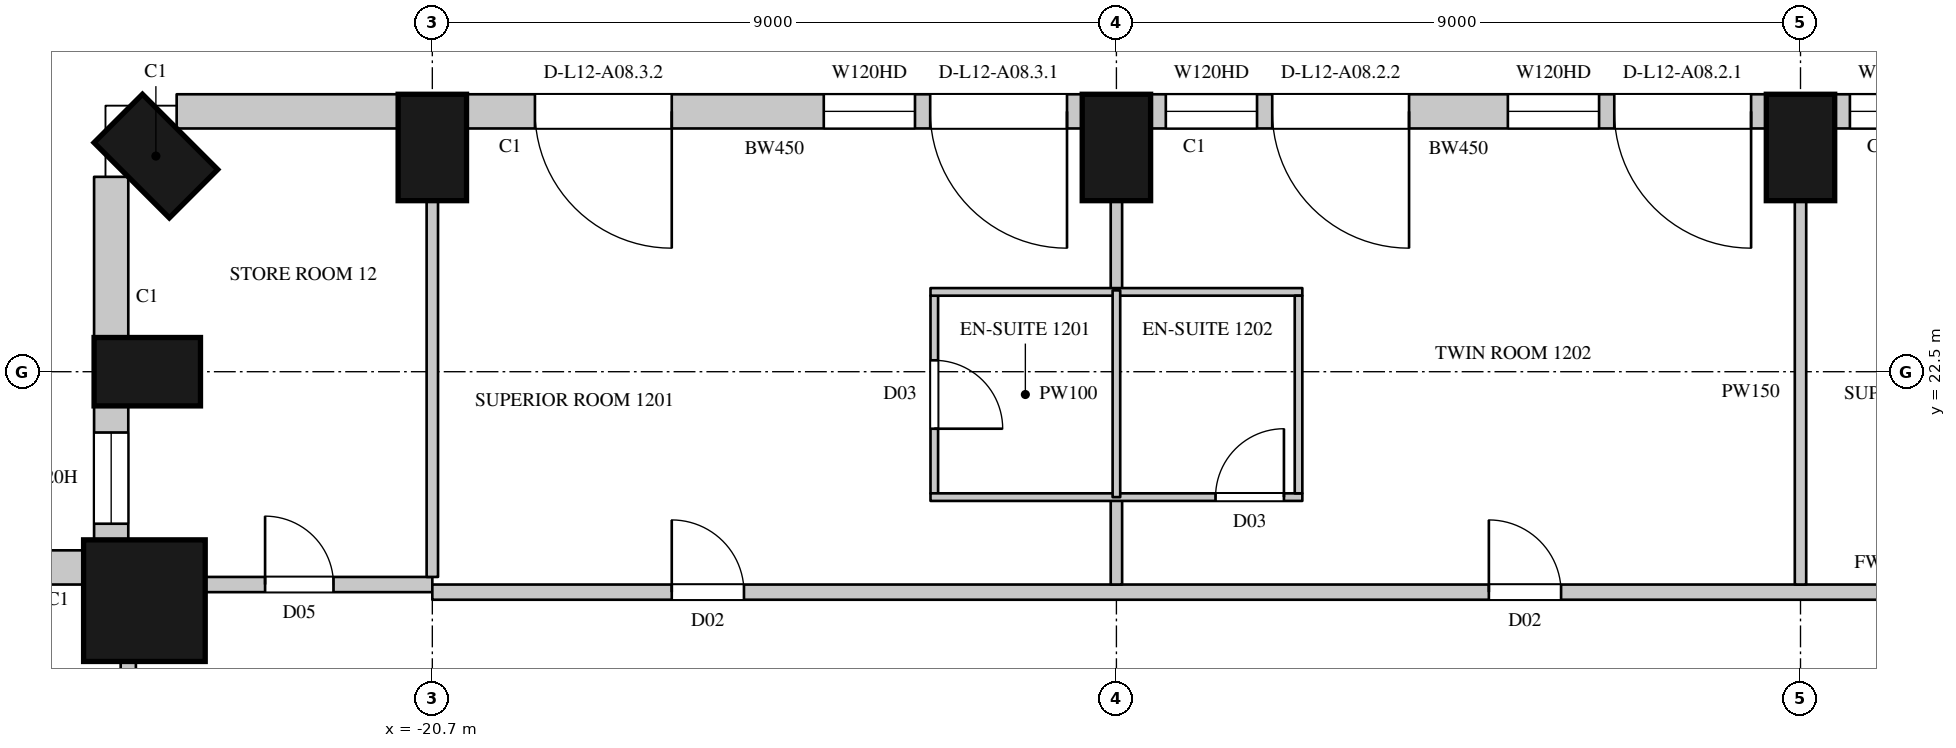
"""IFC4 building model, lengths in metres.
Left out: names, types, materials, properties, quantities, classifications, styles, units other than length and angle.
Written with IfcOpenShell. Run it as: python <this file> out.ifc"""

import sys

from ifc_helpers import new_model, si_unit, direction, frame, frame_2d, origin, origin_2d, place, context, subcontext, project, spatial, rectangle, circle, extrude, element, fill, save


model = new_model("IFC4")
c1 = context("Model", 3, precision=1e-05, world=origin(), true_north=direction((0.0, 1.0)))
c2 = subcontext(c1, "Body", "Model", "MODEL_VIEW")
j1 = project(units=[si_unit("LENGTHUNIT", "METRE"), si_unit("PLANEANGLEUNIT", "RADIAN")], contexts=[c1])
p1 = place(None, origin())
s1 = spatial("IfcSite", under=j1, at=p1, CompositionType="ELEMENT")
p2 = place(p1, origin())
s2 = spatial("IfcBuilding", under=s1, at=p2, CompositionType="ELEMENT")
p3 = place(p2, frame((0.0, 0.0, 73.5)))
s3 = spatial("IfcBuildingStorey", under=s2, at=p3, CompositionType="ELEMENT", Elevation=73.5)
for number, where, z_axis, x_axis in (
    (1, (-2.7, 25.45, 0.0), (0.0, 0.0, 1.0), (-1.0, 0.0, 0.0)),
    (2, (-11.7, 25.45, 0.0), (0.0, 0.0, 1.0), (-1.0, 0.0, 0.0)),
    (3, (-20.7, 25.45, 0.0), (0.0, 0.0, 1.0), (-1.0, 0.0, 0.0)),
    (4, (-24.337, 25.337, 0.0), (0.0, 0.0, 1.0), (-0.707, -0.707, 0.0)),
    (5, (-24.45, 22.5, 0.0), (0.0, 0.0, 1.0), (0.0, -1.0, 0.0)),
):
    element("IfcColumn", number, at=place(p3, frame(where, z_axis=z_axis, x_axis=x_axis)), inside=s3, PredefinedType="COLUMN", context=c2, shape_type="SweptSolid", body=[
        extrude(rectangle(XDim=0.9, YDim=1.4, at=origin_2d()), origin(), (0.0, 0.0, 1.0), 3.6),
    ])
p4 = place(p3, frame((-24.488, 19.488, 0.0), z_axis=(0.0, 0.0, 1.0), x_axis=(1.0, 0.0, 0.0)))
e6 = element("IfcColumn", 6, at=p4, inside=s3, PredefinedType="COLUMN", context=c2, shape_type="SweptSolid", body=[
    extrude(circle(Radius=0.8, at=origin_2d()), origin(), (0.0, 0.0, 1.0), 3.6),
])
p5 = place(p3, frame((5.85, 25.925, 0.0), z_axis=(0.0, 0.0, 1.0), x_axis=(-1.0, 0.0, 0.0)))
e7 = element("IfcWall", 7, at=p5, inside=s3, PredefinedType="SOLIDWALL", context=c2, shape_type="SweptSolid", body=[
    extrude(rectangle(XDim=8.1, YDim=0.45, at=frame_2d((4.05, 0.0))), origin(), (0.0, 0.0, 1.0), 3.3),
])
p6 = place(p5, frame((0.2, 0.0, 0.0)))
e8 = element("IfcOpeningElement", 8, at=p6, cuts=e7, PredefinedType="OPENING", context=c2, shape_type="SweptSolid", body=[
    extrude(rectangle(XDim=1.8, YDim=2.4, at=frame_2d((0.9, 1.2))), frame((0.0, 0.235, 0.0), z_axis=(0.0, -1.0, 0.0), x_axis=(1.0, 0.0, 0.0)), (0.0, 0.0, 1.0), 0.47),
])
p7 = place(p5, frame((2.2, 0.0, 1.05)))
e9 = element("IfcOpeningElement", 9, at=p7, cuts=e7, PredefinedType="OPENING", context=c2, shape_type="SweptSolid", body=[
    extrude(rectangle(XDim=1.2, YDim=2.0, at=frame_2d((0.6, 1.0))), frame((0.0, 0.235, 0.0), z_axis=(0.0, -1.0, 0.0), x_axis=(1.0, 0.0, 0.0)), (0.0, 0.0, 1.0), 0.47),
])
p8 = place(p5, frame((4.7, 0.0, 0.0)))
e10 = element("IfcOpeningElement", 10, at=p8, cuts=e7, PredefinedType="OPENING", context=c2, shape_type="SweptSolid", body=[
    extrude(rectangle(XDim=1.8, YDim=2.4, at=frame_2d((0.9, 1.2))), frame((0.0, 0.235, 0.0), z_axis=(0.0, -1.0, 0.0), x_axis=(1.0, 0.0, 0.0)), (0.0, 0.0, 1.0), 0.47),
])
p9 = place(p5, frame((6.7, 0.0, 1.05)))
e11 = element("IfcOpeningElement", 11, at=p9, cuts=e7, PredefinedType="OPENING", context=c2, shape_type="SweptSolid", body=[
    extrude(rectangle(XDim=1.2, YDim=2.0, at=frame_2d((0.6, 1.0))), frame((0.0, 0.235, 0.0), z_axis=(0.0, -1.0, 0.0), x_axis=(1.0, 0.0, 0.0)), (0.0, 0.0, 1.0), 0.47),
])
p10 = place(p3, frame((-3.15, 25.925, 0.0), z_axis=(0.0, 0.0, 1.0), x_axis=(-1.0, 0.0, 0.0)))
e12 = element("IfcWall", 12, at=p10, inside=s3, PredefinedType="SOLIDWALL", context=c2, shape_type="SweptSolid", body=[
    extrude(rectangle(XDim=8.1, YDim=0.45, at=frame_2d((4.05, 0.0))), origin(), (0.0, 0.0, 1.0), 3.3),
])
p11 = place(p10, frame((0.2, 0.0, 0.0)))
e13 = element("IfcOpeningElement", 13, at=p11, cuts=e12, PredefinedType="OPENING", context=c2, shape_type="SweptSolid", body=[
    extrude(rectangle(XDim=1.8, YDim=2.4, at=frame_2d((0.9, 1.2))), frame((0.0, 0.235, 0.0), z_axis=(0.0, -1.0, 0.0), x_axis=(1.0, 0.0, 0.0)), (0.0, 0.0, 1.0), 0.47),
])
p12 = place(p10, frame((2.2, 0.0, 1.05)))
e14 = element("IfcOpeningElement", 14, at=p12, cuts=e12, PredefinedType="OPENING", context=c2, shape_type="SweptSolid", body=[
    extrude(rectangle(XDim=1.2, YDim=2.0, at=frame_2d((0.6, 1.0))), frame((0.0, 0.235, 0.0), z_axis=(0.0, -1.0, 0.0), x_axis=(1.0, 0.0, 0.0)), (0.0, 0.0, 1.0), 0.47),
])
p13 = place(p10, frame((4.7, 0.0, 0.0)))
e15 = element("IfcOpeningElement", 15, at=p13, cuts=e12, PredefinedType="OPENING", context=c2, shape_type="SweptSolid", body=[
    extrude(rectangle(XDim=1.8, YDim=2.4, at=frame_2d((0.9, 1.2))), frame((0.0, 0.235, 0.0), z_axis=(0.0, -1.0, 0.0), x_axis=(1.0, 0.0, 0.0)), (0.0, 0.0, 1.0), 0.47),
])
p14 = place(p10, frame((6.7, 0.0, 1.05)))
e16 = element("IfcOpeningElement", 16, at=p14, cuts=e12, PredefinedType="OPENING", context=c2, shape_type="SweptSolid", body=[
    extrude(rectangle(XDim=1.2, YDim=2.0, at=frame_2d((0.6, 1.0))), frame((0.0, 0.235, 0.0), z_axis=(0.0, -1.0, 0.0), x_axis=(1.0, 0.0, 0.0)), (0.0, 0.0, 1.0), 0.47),
])
p15 = place(p3, frame((-12.15, 25.925, 0.0), z_axis=(0.0, 0.0, 1.0), x_axis=(-1.0, 0.0, 0.0)))
e17 = element("IfcWall", 17, at=p15, inside=s3, PredefinedType="SOLIDWALL", context=c2, shape_type="SweptSolid", body=[
    extrude(rectangle(XDim=8.1, YDim=0.45, at=frame_2d((4.05, 0.0))), origin(), (0.0, 0.0, 1.0), 3.3),
])
p16 = place(p15, frame((0.2, 0.0, 0.0)))
e18 = element("IfcOpeningElement", 18, at=p16, cuts=e17, PredefinedType="OPENING", context=c2, shape_type="SweptSolid", body=[
    extrude(rectangle(XDim=1.8, YDim=2.4, at=frame_2d((0.9, 1.2))), frame((0.0, 0.235, 0.0), z_axis=(0.0, -1.0, 0.0), x_axis=(1.0, 0.0, 0.0)), (0.0, 0.0, 1.0), 0.47),
])
p17 = place(p15, frame((2.2, 0.0, 1.05)))
e19 = element("IfcOpeningElement", 19, at=p17, cuts=e17, PredefinedType="OPENING", context=c2, shape_type="SweptSolid", body=[
    extrude(rectangle(XDim=1.2, YDim=2.0, at=frame_2d((0.6, 1.0))), frame((0.0, 0.235, 0.0), z_axis=(0.0, -1.0, 0.0), x_axis=(1.0, 0.0, 0.0)), (0.0, 0.0, 1.0), 0.47),
])
p18 = place(p15, frame((5.4, 0.0, 0.0)))
e20 = element("IfcOpeningElement", 20, at=p18, cuts=e17, PredefinedType="OPENING", context=c2, shape_type="SweptSolid", body=[
    extrude(rectangle(XDim=1.8, YDim=2.4, at=frame_2d((0.9, 1.2))), frame((0.0, 0.235, 0.0), z_axis=(0.0, -1.0, 0.0), x_axis=(1.0, 0.0, 0.0)), (0.0, 0.0, 1.0), 0.47),
])
p19 = place(p3, frame((-21.15, 25.925, 0.0), z_axis=(0.0, 0.0, 1.0), x_axis=(-1.0, 0.0, 0.0)))
e21 = element("IfcWall", 21, at=p19, inside=s3, PredefinedType="SOLIDWALL", context=c2, shape_type="SweptSolid", body=[
    extrude(rectangle(XDim=2.914, YDim=0.45, at=frame_2d((1.457, 0.0))), origin(), (0.0, 0.0, 1.0), 3.3),
])
p20 = place(p3, frame((-24.925, 25.064, 0.0), z_axis=(0.0, 0.0, 1.0), x_axis=(0.0, -1.0, 0.0)))
e22 = element("IfcWall", 22, at=p20, inside=s3, PredefinedType="SOLIDWALL", context=c2, shape_type="SweptSolid", body=[
    extrude(rectangle(XDim=2.114, YDim=0.45, at=frame_2d((1.057, 0.0))), origin(), (0.0, 0.0, 1.0), 3.3),
])
p21 = place(p3, frame((-24.925, 22.05, 0.0), z_axis=(0.0, 0.0, 1.0), x_axis=(0.0, -1.0, 0.0)))
e23 = element("IfcWall", 23, at=p21, inside=s3, PredefinedType="SOLIDWALL", context=c2, shape_type="SweptSolid", body=[
    extrude(rectangle(XDim=1.792, YDim=0.45, at=frame_2d((0.896, 0.0))), origin(), (0.0, 0.0, 1.0), 3.3),
])
p22 = place(p21, frame((0.35, 0.0, 1.05)))
e24 = element("IfcOpeningElement", 24, at=p22, cuts=e23, PredefinedType="OPENING", context=c2, shape_type="SweptSolid", body=[
    extrude(rectangle(XDim=1.2, YDim=2.0, at=frame_2d((0.6, 1.0))), frame((0.0, 0.235, 0.0), z_axis=(0.0, -1.0, 0.0), x_axis=(1.0, 0.0, 0.0)), (0.0, 0.0, 1.0), 0.47),
])
p23 = place(p3, frame((-25.259, 19.925, 0.0), z_axis=(0.0, 0.0, 1.0), x_axis=(-1.0, 0.0, 0.0)))
e25 = element("IfcWall", 25, at=p23, inside=s3, PredefinedType="SOLIDWALL", context=c2, shape_type="SweptSolid", body=[
    extrude(rectangle(XDim=3.805, YDim=0.45, at=frame_2d((1.903, 0.0))), origin(), (0.0, 0.0, 1.0), 3.3),
])
p24 = place(p23, frame((0.592, 0.0, 1.05)))
e26 = element("IfcOpeningElement", 26, at=p24, cuts=e25, PredefinedType="OPENING", context=c2, shape_type="SweptSolid", body=[
    extrude(rectangle(XDim=2.7, YDim=2.0, at=frame_2d((1.35, 1.0))), frame((0.0, 0.235, 0.0), z_axis=(0.0, -1.0, 0.0), x_axis=(1.0, 0.0, 0.0)), (0.0, 0.0, 1.0), 0.47),
])
p25 = place(p3, frame((-24.7, 16.03, 0.0), z_axis=(0.0, 0.0, 1.0), x_axis=(0.0, 1.0, 0.0)))
e27 = element("IfcWall", 27, at=p25, inside=s3, PredefinedType="PARTITIONING", context=c2, shape_type="SweptSolid", body=[
    extrude(rectangle(XDim=2.67, YDim=0.2, at=frame_2d((1.335, 0.0))), origin(), (0.0, 0.0, 1.0), 3.3),
])
p26 = place(p25, frame((0.45, 0.0, 0.0)))
e28 = element("IfcOpeningElement", 28, at=p26, cuts=e27, PredefinedType="OPENING", context=c2, shape_type="SweptSolid", body=[
    extrude(rectangle(XDim=1.6, YDim=2.4, at=frame_2d((0.8, 1.2))), frame((0.0, 0.11, 0.0), z_axis=(0.0, -1.0, 0.0), x_axis=(1.0, 0.0, 0.0)), (0.0, 0.0, 1.0), 0.22),
])
p27 = place(p3, frame((-23.7, 19.7, 0.0), z_axis=(0.0, 0.0, 1.0), x_axis=(1.0, 0.0, 0.0)))
e29 = element("IfcWall", 29, at=p27, inside=s3, PredefinedType="PARTITIONING", context=c2, shape_type="SweptSolid", body=[
    extrude(rectangle(XDim=3.0, YDim=0.2, at=frame_2d((1.5, 0.0))), origin(), (0.0, 0.0, 1.0), 3.3),
])
p28 = place(p27, frame((0.8, 0.0, 0.0)))
e30 = element("IfcOpeningElement", 30, at=p28, cuts=e29, PredefinedType="OPENING", context=c2, shape_type="SweptSolid", body=[
    extrude(rectangle(XDim=0.9, YDim=2.2, at=frame_2d((0.45, 1.1))), frame((0.0, 0.11, 0.0), z_axis=(0.0, -1.0, 0.0), x_axis=(1.0, 0.0, 0.0)), (0.0, 0.0, 1.0), 0.22),
])
p29 = place(p3, frame((-20.7, 19.6, 0.0), z_axis=(0.0, 0.0, 1.0), x_axis=(1.0, 0.0, 0.0)))
e31 = element("IfcWall", 31, at=p29, inside=s3, PredefinedType="PARTITIONING", context=c2, shape_type="SweptSolid", body=[
    extrude(rectangle(XDim=38.184, YDim=0.2, at=frame_2d((19.092, 0.0))), origin(), (0.0, 0.0, 1.0), 3.3),
])
p30 = place(p29, frame((3.15, 0.0, 0.0)))
e32 = element("IfcOpeningElement", 32, at=p30, cuts=e31, PredefinedType="OPENING", context=c2, shape_type="SweptSolid", body=[
    extrude(rectangle(XDim=0.95, YDim=2.2, at=frame_2d((0.475, 1.1))), frame((0.0, 0.11, 0.0), z_axis=(0.0, -1.0, 0.0), x_axis=(1.0, 0.0, 0.0)), (0.0, 0.0, 1.0), 0.22),
])
p31 = place(p29, frame((13.9, 0.0, 0.0)))
e33 = element("IfcOpeningElement", 33, at=p31, cuts=e31, PredefinedType="OPENING", context=c2, shape_type="SweptSolid", body=[
    extrude(rectangle(XDim=0.95, YDim=2.2, at=frame_2d((0.475, 1.1))), frame((0.0, 0.11, 0.0), z_axis=(0.0, -1.0, 0.0), x_axis=(1.0, 0.0, 0.0)), (0.0, 0.0, 1.0), 0.22),
])
p32 = place(p29, frame((21.15, 0.0, 0.0)))
e34 = element("IfcOpeningElement", 34, at=p32, cuts=e31, PredefinedType="OPENING", context=c2, shape_type="SweptSolid", body=[
    extrude(rectangle(XDim=0.95, YDim=2.2, at=frame_2d((0.475, 1.1))), frame((0.0, 0.11, 0.0), z_axis=(0.0, -1.0, 0.0), x_axis=(1.0, 0.0, 0.0)), (0.0, 0.0, 1.0), 0.22),
])
p33 = place(p29, frame((31.9, 0.0, 0.0)))
e35 = element("IfcOpeningElement", 35, at=p33, cuts=e31, PredefinedType="OPENING", context=c2, shape_type="SweptSolid", body=[
    extrude(rectangle(XDim=0.95, YDim=2.2, at=frame_2d((0.475, 1.1))), frame((0.0, 0.11, 0.0), z_axis=(0.0, -1.0, 0.0), x_axis=(1.0, 0.0, 0.0)), (0.0, 0.0, 1.0), 0.22),
])
p34 = place(p29, frame((36.85, 0.0, 0.0)))
e36 = element("IfcOpeningElement", 36, at=p34, cuts=e31, PredefinedType="OPENING", context=c2, shape_type="SweptSolid", body=[
    extrude(rectangle(XDim=0.95, YDim=2.2, at=frame_2d((0.475, 1.1))), frame((0.0, 0.11, 0.0), z_axis=(0.0, -1.0, 0.0), x_axis=(1.0, 0.0, 0.0)), (0.0, 0.0, 1.0), 0.22),
])
p35 = place(p3, frame((-20.7, 19.8, 0.0), z_axis=(0.0, 0.0, 1.0), x_axis=(0.0, 1.0, 0.0)))
e37 = element("IfcWall", 37, at=p35, inside=s3, PredefinedType="PARTITIONING", context=c2, shape_type="SweptSolid", body=[
    extrude(rectangle(XDim=4.95, YDim=0.15, at=frame_2d((2.475, 0.0))), origin(), (0.0, 0.0, 1.0), 2.75),
])
p36 = place(p3, frame((-11.7, 19.7, 0.0), z_axis=(0.0, 0.0, 1.0), x_axis=(0.0, 1.0, 0.0)))
e38 = element("IfcWall", 38, at=p36, inside=s3, PredefinedType="PARTITIONING", context=c2, shape_type="SweptSolid", body=[
    extrude(rectangle(XDim=1.15, YDim=0.15, at=frame_2d((0.575, 0.0))), origin(), (0.0, 0.0, 1.0), 2.75),
])
p37 = place(p3, frame((-11.7, 23.57, 0.0), z_axis=(0.0, 0.0, 1.0), x_axis=(0.0, 1.0, 0.0)))
e39 = element("IfcWall", 39, at=p37, inside=s3, PredefinedType="PARTITIONING", context=c2, shape_type="SweptSolid", body=[
    extrude(rectangle(XDim=1.18, YDim=0.15, at=frame_2d((0.59, 0.0))), origin(), (0.0, 0.0, 1.0), 2.75),
])
p38 = place(p3, frame((-2.7, 19.7, 0.0), z_axis=(0.0, 0.0, 1.0), x_axis=(0.0, 1.0, 0.0)))
e40 = element("IfcWall", 40, at=p38, inside=s3, PredefinedType="PARTITIONING", context=c2, shape_type="SweptSolid", body=[
    extrude(rectangle(XDim=5.05, YDim=0.15, at=frame_2d((2.525, 0.0))), origin(), (0.0, 0.0, 1.0), 2.75),
])
p39 = place(p3, frame((-14.096, 20.9, 0.0), z_axis=(0.0, 0.0, 1.0), x_axis=(0.0, 1.0, 0.0)))
e41 = element("IfcWall", 41, at=p39, inside=s3, PredefinedType="PARTITIONING", context=c2, shape_type="SweptSolid", body=[
    extrude(rectangle(XDim=2.6, YDim=0.1, at=frame_2d((1.3, 0.0))), origin(), (0.0, 0.0, 1.0), 3.3),
])
p40 = place(p39, frame((0.85, 0.0, 0.0)))
e42 = element("IfcOpeningElement", 42, at=p40, cuts=e41, PredefinedType="OPENING", context=c2, shape_type="SweptSolid", body=[
    extrude(rectangle(XDim=0.9, YDim=2.2, at=frame_2d((0.45, 1.1))), frame((0.0, 0.06, 0.0), z_axis=(0.0, -1.0, 0.0), x_axis=(1.0, 0.0, 0.0)), (0.0, 0.0, 1.0), 0.12),
])
p41 = place(p3, frame((-14.146, 20.85, 0.0), z_axis=(0.0, 0.0, 1.0), x_axis=(1.0, 0.0, 0.0)))
e43 = element("IfcWall", 43, at=p41, inside=s3, PredefinedType="PARTITIONING", context=c2, shape_type="SweptSolid", body=[
    extrude(rectangle(XDim=4.892, YDim=0.1, at=frame_2d((2.446, 0.0))), origin(), (0.0, 0.0, 1.0), 3.3),
])
p42 = place(p41, frame((3.75, 0.0, 0.0)))
e44 = element("IfcOpeningElement", 44, at=p42, cuts=e43, PredefinedType="OPENING", context=c2, shape_type="SweptSolid", body=[
    extrude(rectangle(XDim=0.9, YDim=2.2, at=frame_2d((0.45, 1.1))), frame((0.0, 0.06, 0.0), z_axis=(0.0, -1.0, 0.0), x_axis=(1.0, 0.0, 0.0)), (0.0, 0.0, 1.0), 0.12),
])
p43 = place(p3, frame((-14.146, 23.55, 0.0), z_axis=(0.0, 0.0, 1.0), x_axis=(1.0, 0.0, 0.0)))
e45 = element("IfcWall", 45, at=p43, inside=s3, PredefinedType="PARTITIONING", context=c2, shape_type="SweptSolid", body=[
    extrude(rectangle(XDim=4.892, YDim=0.1, at=frame_2d((2.446, 0.0))), origin(), (0.0, 0.0, 1.0), 3.3),
])
p44 = place(p3, frame((-11.7, 20.85, 0.0), z_axis=(0.0, 0.0, 1.0), x_axis=(0.0, 1.0, 0.0)))
e46 = element("IfcWall", 46, at=p44, inside=s3, PredefinedType="PARTITIONING", context=c2, shape_type="SweptSolid", body=[
    extrude(rectangle(XDim=2.72, YDim=0.1, at=frame_2d((1.36, 0.0))), origin(), (0.0, 0.0, 1.0), 2.75),
])
p45 = place(p3, frame((-9.304, 20.9, 0.0), z_axis=(0.0, 0.0, 1.0), x_axis=(0.0, 1.0, 0.0)))
e47 = element("IfcWall", 47, at=p45, inside=s3, PredefinedType="PARTITIONING", context=c2, shape_type="SweptSolid", body=[
    extrude(rectangle(XDim=2.6, YDim=0.1, at=frame_2d((1.3, 0.0))), origin(), (0.0, 0.0, 1.0), 3.3),
])
p46 = place(p9, origin())
e48 = element("IfcWindow", 48, at=p46, inside=s3, PartitioningType="SINGLE_PANEL", PredefinedType="WINDOW", context=c2, shape_type="SweptSolid", body=[
    extrude(rectangle(XDim=1.2, YDim=2.0, at=frame_2d((0.6, 1.0))), frame((0.0, 0.135, 0.0), z_axis=(0.0, -1.0, 0.0), x_axis=(1.0, 0.0, 0.0)), (0.0, 0.0, 1.0), 0.06),
])
fill(e11, e48)
p47 = place(p11, origin())
e49 = element("IfcDoor", 49, at=p47, inside=s3, OperationType="SLIDING_TO_LEFT", PredefinedType="DOOR", context=c2, shape_type="SweptSolid", body=[
    extrude(rectangle(XDim=1.8, YDim=2.4, at=frame_2d((0.9, 1.2))), frame((0.0, 0.13, 0.0), z_axis=(0.0, -1.0, 0.0), x_axis=(1.0, 0.0, 0.0)), (0.0, 0.0, 1.0), 0.05),
])
fill(e13, e49)
p48 = place(p12, origin())
e50 = element("IfcWindow", 50, at=p48, inside=s3, PartitioningType="SINGLE_PANEL", PredefinedType="WINDOW", context=c2, shape_type="SweptSolid", body=[
    extrude(rectangle(XDim=1.2, YDim=2.0, at=frame_2d((0.6, 1.0))), frame((0.0, 0.135, 0.0), z_axis=(0.0, -1.0, 0.0), x_axis=(1.0, 0.0, 0.0)), (0.0, 0.0, 1.0), 0.06),
])
fill(e14, e50)
p49 = place(p13, origin())
e51 = element("IfcDoor", 51, at=p49, inside=s3, OperationType="SLIDING_TO_LEFT", PredefinedType="DOOR", context=c2, shape_type="SweptSolid", body=[
    extrude(rectangle(XDim=1.8, YDim=2.4, at=frame_2d((0.9, 1.2))), frame((0.0, 0.13, 0.0), z_axis=(0.0, -1.0, 0.0), x_axis=(1.0, 0.0, 0.0)), (0.0, 0.0, 1.0), 0.05),
])
fill(e15, e51)
p50 = place(p14, origin())
e52 = element("IfcWindow", 52, at=p50, inside=s3, PartitioningType="SINGLE_PANEL", PredefinedType="WINDOW", context=c2, shape_type="SweptSolid", body=[
    extrude(rectangle(XDim=1.2, YDim=2.0, at=frame_2d((0.6, 1.0))), frame((0.0, 0.135, 0.0), z_axis=(0.0, -1.0, 0.0), x_axis=(1.0, 0.0, 0.0)), (0.0, 0.0, 1.0), 0.06),
])
fill(e16, e52)
p51 = place(p16, origin())
e53 = element("IfcDoor", 53, at=p51, inside=s3, OperationType="SLIDING_TO_LEFT", PredefinedType="DOOR", context=c2, shape_type="SweptSolid", body=[
    extrude(rectangle(XDim=1.8, YDim=2.4, at=frame_2d((0.9, 1.2))), frame((0.0, 0.13, 0.0), z_axis=(0.0, -1.0, 0.0), x_axis=(1.0, 0.0, 0.0)), (0.0, 0.0, 1.0), 0.05),
])
fill(e18, e53)
p52 = place(p17, origin())
e54 = element("IfcWindow", 54, at=p52, inside=s3, PartitioningType="SINGLE_PANEL", PredefinedType="WINDOW", context=c2, shape_type="SweptSolid", body=[
    extrude(rectangle(XDim=1.2, YDim=2.0, at=frame_2d((0.6, 1.0))), frame((0.0, 0.135, 0.0), z_axis=(0.0, -1.0, 0.0), x_axis=(1.0, 0.0, 0.0)), (0.0, 0.0, 1.0), 0.06),
])
fill(e19, e54)
p53 = place(p18, origin())
e55 = element("IfcDoor", 55, at=p53, inside=s3, OperationType="SLIDING_TO_LEFT", PredefinedType="DOOR", context=c2, shape_type="SweptSolid", body=[
    extrude(rectangle(XDim=1.8, YDim=2.4, at=frame_2d((0.9, 1.2))), frame((0.0, 0.13, 0.0), z_axis=(0.0, -1.0, 0.0), x_axis=(1.0, 0.0, 0.0)), (0.0, 0.0, 1.0), 0.05),
])
fill(e20, e55)
p54 = place(p22, origin())
e56 = element("IfcWindow", 56, at=p54, inside=s3, PartitioningType="SINGLE_PANEL", PredefinedType="WINDOW", context=c2, shape_type="SweptSolid", body=[
    extrude(rectangle(XDim=1.2, YDim=2.0, at=frame_2d((0.6, 1.0))), frame((0.0, 0.135, 0.0), z_axis=(0.0, -1.0, 0.0), x_axis=(1.0, 0.0, 0.0)), (0.0, 0.0, 1.0), 0.06),
])
fill(e24, e56)
p55 = place(p28, origin())
e57 = element("IfcDoor", 57, at=p55, inside=s3, OperationType="SINGLE_SWING_LEFT", PredefinedType="DOOR", context=c2, shape_type="SweptSolid", body=[
    extrude(rectangle(XDim=0.9, YDim=2.2, at=frame_2d((0.45, 1.1))), frame((0.0, 0.025, 0.0), z_axis=(0.0, -1.0, 0.0), x_axis=(1.0, 0.0, 0.0)), (0.0, 0.0, 1.0), 0.05),
])
fill(e30, e57)
p56 = place(p30, origin())
e58 = element("IfcDoor", 58, at=p56, inside=s3, OperationType="SINGLE_SWING_LEFT", PredefinedType="DOOR", context=c2, shape_type="SweptSolid", body=[
    extrude(rectangle(XDim=0.95, YDim=2.2, at=frame_2d((0.475, 1.1))), frame((0.0, 0.025, 0.0), z_axis=(0.0, -1.0, 0.0), x_axis=(1.0, 0.0, 0.0)), (0.0, 0.0, 1.0), 0.05),
])
fill(e32, e58)
p57 = place(p40, origin())
e59 = element("IfcDoor", 59, at=p57, inside=s3, OperationType="SINGLE_SWING_RIGHT", PredefinedType="DOOR", context=c2, shape_type="SweptSolid", body=[
    extrude(rectangle(XDim=0.9, YDim=2.2, at=frame_2d((0.45, 1.1))), frame((0.0, 0.025, 0.0), z_axis=(0.0, -1.0, 0.0), x_axis=(1.0, 0.0, 0.0)), (0.0, 0.0, 1.0), 0.05),
])
fill(e42, e59)
p58 = place(p31, origin())
e60 = element("IfcDoor", 60, at=p58, inside=s3, OperationType="SINGLE_SWING_LEFT", PredefinedType="DOOR", context=c2, shape_type="SweptSolid", body=[
    extrude(rectangle(XDim=0.95, YDim=2.2, at=frame_2d((0.475, 1.1))), frame((0.0, 0.025, 0.0), z_axis=(0.0, -1.0, 0.0), x_axis=(1.0, 0.0, 0.0)), (0.0, 0.0, 1.0), 0.05),
])
fill(e33, e60)
p59 = place(p42, origin())
e61 = element("IfcDoor", 61, at=p59, inside=s3, OperationType="SINGLE_SWING_RIGHT", PredefinedType="DOOR", context=c2, shape_type="SweptSolid", body=[
    extrude(rectangle(XDim=0.9, YDim=2.2, at=frame_2d((0.45, 1.1))), frame((0.0, 0.025, 0.0), z_axis=(0.0, -1.0, 0.0), x_axis=(1.0, 0.0, 0.0)), (0.0, 0.0, 1.0), 0.05),
])
fill(e44, e61)
save(model, sys.argv[1])
